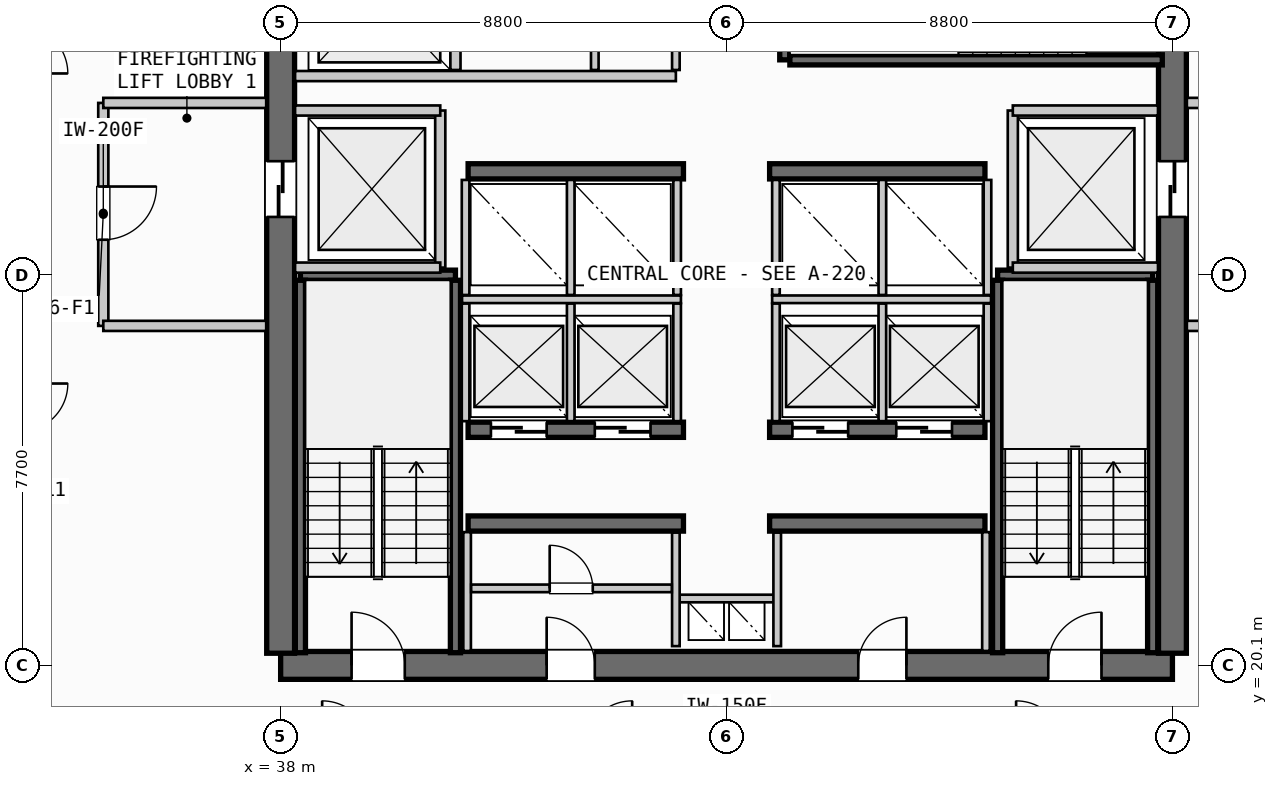
"""IFC4 building model, lengths in metres.
Left out: names, types, materials, properties, quantities, classifications, styles, units other than length and angle.
Written with IfcOpenShell. Run it as: python <this file> out.ifc"""

import sys

from ifc_helpers import new_model, si_unit, direction, frame, frame_2d, origin, place, context, subcontext, project, spatial, rectangle, extrude, source, transform, mapped, element, fill, save


model = new_model("IFC4")
c1 = context("Model", 3, precision=1e-05, world=origin(), true_north=direction((0.0, 1.0)))
c2 = subcontext(c1, "Body", "Model", "MODEL_VIEW")
j1 = project(units=[si_unit("LENGTHUNIT", "METRE"), si_unit("PLANEANGLEUNIT", "RADIAN")], contexts=[c1])
p1 = place(None, origin())
s1 = spatial("IfcSite", under=j1, at=p1, CompositionType="ELEMENT")
p2 = place(p1, origin())
s2 = spatial("IfcBuilding", under=s1, at=p2, CompositionType="ELEMENT")
p3 = place(p2, frame((0.0, 0.0, 143.0)))
s3 = spatial("IfcBuildingStorey", under=s2, at=p3, CompositionType="ELEMENT", Elevation=143.0)
p4 = place(p3, frame((38.0, 20.1, 0.0), z_axis=(0.0, 0.0, 1.0), x_axis=(1.0, 0.0, 0.0)))
e1 = element("IfcWall", 1, at=p4, inside=s3, PredefinedType="SHEAR", context=c2, shape_type="SweptSolid", body=[
    extrude(rectangle(XDim=17.6, YDim=0.55, at=frame_2d((8.8, 0.0))), origin(), (0.0, 0.0, 1.0), 3.3),
])
p5 = place(p4, frame((1.4, 0.0, 0.0)))
e2 = element("IfcOpeningElement", 2, at=p5, cuts=e1, PredefinedType="OPENING", context=c2, shape_type="SweptSolid", body=[
    extrude(rectangle(XDim=1.05, YDim=2.15, at=frame_2d((0.525, 1.075))), frame((0.0, 0.285, 0.0), z_axis=(0.0, -1.0, 0.0), x_axis=(1.0, 0.0, 0.0)), (0.0, 0.0, 1.0), 0.57),
])
p6 = place(p4, frame((15.15, 0.0, 0.0)))
e3 = element("IfcOpeningElement", 3, at=p6, cuts=e1, PredefinedType="OPENING", context=c2, shape_type="SweptSolid", body=[
    extrude(rectangle(XDim=1.05, YDim=2.15, at=frame_2d((0.525, 1.075))), frame((0.0, 0.285, 0.0), z_axis=(0.0, -1.0, 0.0), x_axis=(1.0, 0.0, 0.0)), (0.0, 0.0, 1.0), 0.57),
])
p7 = place(p4, frame((5.25, 0.0, 0.0)))
e4 = element("IfcOpeningElement", 4, at=p7, cuts=e1, PredefinedType="OPENING", context=c2, shape_type="SweptSolid", body=[
    extrude(rectangle(XDim=0.95, YDim=2.15, at=frame_2d((0.475, 1.075))), frame((0.0, 0.285, 0.0), z_axis=(0.0, -1.0, 0.0), x_axis=(1.0, 0.0, 0.0)), (0.0, 0.0, 1.0), 0.57),
])
p8 = place(p4, frame((11.4, 0.0, 0.0)))
e5 = element("IfcOpeningElement", 5, at=p8, cuts=e1, PredefinedType="OPENING", context=c2, shape_type="SweptSolid", body=[
    extrude(rectangle(XDim=0.95, YDim=2.15, at=frame_2d((0.475, 1.075))), frame((0.0, 0.285, 0.0), z_axis=(0.0, -1.0, 0.0), x_axis=(1.0, 0.0, 0.0)), (0.0, 0.0, 1.0), 0.57),
])
p9 = place(p3, frame((38.0, 35.26, 0.0), z_axis=(0.0, 0.0, 1.0), x_axis=(0.0, -1.0, 0.0)))
e6 = element("IfcWall", 6, at=p9, inside=s3, PredefinedType="SHEAR", context=c2, shape_type="SweptSolid", body=[
    extrude(rectangle(XDim=14.92, YDim=0.55, at=frame_2d((7.46, 0.0))), origin(), (0.0, 0.0, 1.0), 3.3),
])
p10 = place(p9, frame((5.21, 0.0, 0.0)))
e7 = element("IfcOpeningElement", 7, at=p10, cuts=e6, PredefinedType="OPENING", context=c2, shape_type="SweptSolid", body=[
    extrude(rectangle(XDim=1.1, YDim=2.2, at=frame_2d((0.55, 1.1))), frame((0.0, 0.285, 0.0), z_axis=(0.0, -1.0, 0.0), x_axis=(1.0, 0.0, 0.0)), (0.0, 0.0, 1.0), 0.57),
])
p11 = place(p3, frame((55.6, 20.34, 0.0), z_axis=(0.0, 0.0, 1.0), x_axis=(0.0, 1.0, 0.0)))
e8 = element("IfcWall", 8, at=p11, inside=s3, PredefinedType="SHEAR", context=c2, shape_type="SweptSolid", body=[
    extrude(rectangle(XDim=14.92, YDim=0.55, at=frame_2d((7.46, 0.0))), origin(), (0.0, 0.0, 1.0), 3.3),
])
p12 = place(p11, frame((12.71, 0.0, 0.0)))
e9 = element("IfcOpeningElement", 9, at=p12, cuts=e8, PredefinedType="OPENING", context=c2, shape_type="SweptSolid", body=[
    extrude(rectangle(XDim=1.05, YDim=2.15, at=frame_2d((0.525, 1.075))), frame((0.0, 0.285, 0.0), z_axis=(0.0, -1.0, 0.0), x_axis=(1.0, 0.0, 0.0)), (0.0, 0.0, 1.0), 0.57),
])
p13 = place(p11, frame((8.61, 0.0, 0.0)))
e10 = element("IfcOpeningElement", 10, at=p13, cuts=e8, PredefinedType="OPENING", context=c2, shape_type="SweptSolid", body=[
    extrude(rectangle(XDim=1.1, YDim=2.2, at=frame_2d((0.55, 1.1))), frame((0.0, 0.285, 0.0), z_axis=(0.0, -1.0, 0.0), x_axis=(1.0, 0.0, 0.0)), (0.0, 0.0, 1.0), 0.57),
])
for number, where, z_axis, x_axis in (
    (11, (41.7, 22.9, 0.0), (0.0, 0.0, 1.0), (1.0, 0.0, 0.0)),
    (12, (47.65, 22.9, 0.0), (0.0, 0.0, 1.0), (1.0, 0.0, 0.0)),
):
    element("IfcWall", number, at=place(p3, frame(where, z_axis=z_axis, x_axis=x_axis)), inside=s3, PredefinedType="SHEAR", context=c2, shape_type="SweptSolid", body=[
        extrude(rectangle(XDim=4.25, YDim=0.3, at=frame_2d((2.125, 0.0))), origin(), (0.0, 0.0, 1.0), 3.3),
    ])
p14 = place(p3, frame((41.7, 24.75, 0.0), z_axis=(0.0, 0.0, 1.0), x_axis=(1.0, 0.0, 0.0)))
e13 = element("IfcWall", 13, at=p14, inside=s3, PredefinedType="SHEAR", context=c2, shape_type="SweptSolid", body=[
    extrude(rectangle(XDim=4.25, YDim=0.3, at=frame_2d((2.125, 0.0))), origin(), (0.0, 0.0, 1.0), 3.3),
])
p15 = place(p14, frame((0.45, 0.0, 0.0)))
e14 = element("IfcOpeningElement", 14, at=p15, cuts=e13, PredefinedType="OPENING", context=c2, shape_type="SweptSolid", body=[
    extrude(rectangle(XDim=1.1, YDim=2.2, at=frame_2d((0.55, 1.1))), frame((0.0, 0.16, 0.0), z_axis=(0.0, -1.0, 0.0), x_axis=(1.0, 0.0, 0.0)), (0.0, 0.0, 1.0), 0.32),
])
p16 = place(p14, frame((2.5, 0.0, 0.0)))
e15 = element("IfcOpeningElement", 15, at=p16, cuts=e13, PredefinedType="OPENING", context=c2, shape_type="SweptSolid", body=[
    extrude(rectangle(XDim=1.1, YDim=2.2, at=frame_2d((0.55, 1.1))), frame((0.0, 0.16, 0.0), z_axis=(0.0, -1.0, 0.0), x_axis=(1.0, 0.0, 0.0)), (0.0, 0.0, 1.0), 0.32),
])
p17 = place(p3, frame((47.65, 24.75, 0.0), z_axis=(0.0, 0.0, 1.0), x_axis=(1.0, 0.0, 0.0)))
e16 = element("IfcWall", 16, at=p17, inside=s3, PredefinedType="SHEAR", context=c2, shape_type="SweptSolid", body=[
    extrude(rectangle(XDim=4.25, YDim=0.3, at=frame_2d((2.125, 0.0))), origin(), (0.0, 0.0, 1.0), 3.3),
])
p18 = place(p17, frame((0.45, 0.0, 0.0)))
e17 = element("IfcOpeningElement", 17, at=p18, cuts=e16, PredefinedType="OPENING", context=c2, shape_type="SweptSolid", body=[
    extrude(rectangle(XDim=1.1, YDim=2.2, at=frame_2d((0.55, 1.1))), frame((0.0, 0.16, 0.0), z_axis=(0.0, -1.0, 0.0), x_axis=(1.0, 0.0, 0.0)), (0.0, 0.0, 1.0), 0.32),
])
p19 = place(p17, frame((2.5, 0.0, 0.0)))
e18 = element("IfcOpeningElement", 18, at=p19, cuts=e16, PredefinedType="OPENING", context=c2, shape_type="SweptSolid", body=[
    extrude(rectangle(XDim=1.1, YDim=2.2, at=frame_2d((0.55, 1.1))), frame((0.0, 0.16, 0.0), z_axis=(0.0, -1.0, 0.0), x_axis=(1.0, 0.0, 0.0)), (0.0, 0.0, 1.0), 0.32),
])
for number, where, z_axis, x_axis in (
    (19, (41.7, 29.85, 0.0), (0.0, 0.0, 1.0), (1.0, 0.0, 0.0)),
    (20, (47.65, 29.85, 0.0), (0.0, 0.0, 1.0), (1.0, 0.0, 0.0)),
):
    element("IfcWall", number, at=place(p3, frame(where, z_axis=z_axis, x_axis=x_axis)), inside=s3, PredefinedType="SHEAR", context=c2, shape_type="SweptSolid", body=[
        extrude(rectangle(XDim=4.25, YDim=0.3, at=frame_2d((2.125, 0.0))), origin(), (0.0, 0.0, 1.0), 3.3),
    ])
p20 = place(p3, frame((38.39, 27.8, 0.0), z_axis=(0.0, 0.0, 1.0), x_axis=(1.0, 0.0, 0.0)))
e21 = element("IfcWall", 21, at=p20, inside=s3, PredefinedType="SHEAR", context=c2, shape_type="SweptSolid", body=[
    extrude(rectangle(XDim=3.06, YDim=0.2, at=frame_2d((1.53, 0.0))), origin(), (0.0, 0.0, 1.0), 3.3),
])
for number, where, z_axis, x_axis in (
    (22, (41.45, 27.7, 0.0), (0.0, 0.0, 1.0), (0.0, -1.0, 0.0)),
    (23, (38.39, 20.35, 0.0), (0.0, 0.0, 1.0), (0.0, 1.0, 0.0)),
):
    element("IfcWall", number, at=place(p3, frame(where, z_axis=z_axis, x_axis=x_axis)), inside=s3, PredefinedType="SHEAR", context=c2, shape_type="SweptSolid", body=[
        extrude(rectangle(XDim=7.35, YDim=0.2, at=frame_2d((3.675, 0.0))), origin(), (0.0, 0.0, 1.0), 3.3),
    ])
p21 = place(p3, frame((52.15, 27.8, 0.0), z_axis=(0.0, 0.0, 1.0), x_axis=(1.0, 0.0, 0.0)))
e24 = element("IfcWall", 24, at=p21, inside=s3, PredefinedType="SHEAR", context=c2, shape_type="SweptSolid", body=[
    extrude(rectangle(XDim=3.06, YDim=0.2, at=frame_2d((1.53, 0.0))), origin(), (0.0, 0.0, 1.0), 3.3),
])
for number, where, z_axis, x_axis in (
    (25, (55.21, 27.7, 0.0), (0.0, 0.0, 1.0), (0.0, -1.0, 0.0)),
    (26, (52.15, 20.35, 0.0), (0.0, 0.0, 1.0), (0.0, 1.0, 0.0)),
):
    element("IfcWall", number, at=place(p3, frame(where, z_axis=z_axis, x_axis=x_axis)), inside=s3, PredefinedType="SHEAR", context=c2, shape_type="SweptSolid", body=[
        extrude(rectangle(XDim=7.35, YDim=0.2, at=frame_2d((3.675, 0.0))), origin(), (0.0, 0.0, 1.0), 3.3),
    ])
p22 = place(p3, frame((47.95, 32.05, 0.0), z_axis=(0.0, 0.0, 1.0), x_axis=(0.0, 1.0, 0.0)))
e27 = element("IfcWall", 27, at=p22, inside=s3, PredefinedType="SHEAR", context=c2, shape_type="SweptSolid", body=[
    extrude(rectangle(XDim=3.06, YDim=0.2, at=frame_2d((1.53, 0.0))), origin(), (0.0, 0.0, 1.0), 3.3),
])
p23 = place(p3, frame((55.4, 32.05, 0.0), z_axis=(0.0, 0.0, 1.0), x_axis=(-1.0, 0.0, 0.0)))
e28 = element("IfcWall", 28, at=p23, inside=s3, PredefinedType="SHEAR", context=c2, shape_type="SweptSolid", body=[
    extrude(rectangle(XDim=7.35, YDim=0.2, at=frame_2d((3.675, 0.0))), origin(), (0.0, 0.0, 1.0), 3.3),
])
p24 = place(p3, frame((45.8, 21.42, 0.0), z_axis=(0.0, 0.0, 1.0), x_axis=(1.0, 0.0, 0.0)))
e29 = element("IfcWall", 29, at=p24, inside=s3, PredefinedType="PARTITIONING", context=c2, shape_type="SweptSolid", body=[
    extrude(rectangle(XDim=2.0, YDim=0.15, at=frame_2d((1.0, 0.0))), origin(), (0.0, 0.0, 1.0), 2.305),
])
for number, where, z_axis, x_axis in (
    (30, (45.8, 20.48, 0.0), (0.0, 0.0, 1.0), (0.0, 1.0, 0.0)),
    (31, (47.8, 20.48, 0.0), (0.0, 0.0, 1.0), (0.0, 1.0, 0.0)),
):
    element("IfcWall", number, at=place(p3, frame(where, z_axis=z_axis, x_axis=x_axis)), inside=s3, PredefinedType="PARTITIONING", context=c2, shape_type="SweptSolid", body=[
        extrude(rectangle(XDim=2.24, YDim=0.15, at=frame_2d((1.12, 0.0))), origin(), (0.0, 0.0, 1.0), 2.305),
    ])
p25 = place(p3, frame((41.15, 27.95, 0.0), z_axis=(0.0, 0.0, 1.0), x_axis=(0.0, 1.0, 0.0)))
e32 = element("IfcWall", 32, at=p25, inside=s3, PredefinedType="PARTITIONING", context=c2, shape_type="SweptSolid", body=[
    extrude(rectangle(XDim=3.1, YDim=0.2, at=frame_2d((1.55, 0.0))), origin(), (0.0, 0.0, 1.0), 2.305),
])
for number, where, z_axis, x_axis in (
    (33, (38.285, 27.95, 0.0), (0.0, 0.0, 1.0), (1.0, 0.0, 0.0)),
    (34, (38.285, 31.05, 0.0), (0.0, 0.0, 1.0), (1.0, 0.0, 0.0)),
):
    element("IfcWall", number, at=place(p3, frame(where, z_axis=z_axis, x_axis=x_axis)), inside=s3, PredefinedType="PARTITIONING", context=c2, shape_type="SweptSolid", body=[
        extrude(rectangle(XDim=2.865, YDim=0.2, at=frame_2d((1.433, 0.0))), origin(), (0.0, 0.0, 1.0), 2.305),
    ])
p26 = place(p3, frame((34.5, 31.2, 0.0), z_axis=(0.0, 0.0, 1.0), x_axis=(0.0, -1.0, 0.0)))
e35 = element("IfcWall", 35, at=p26, inside=s3, PredefinedType="PARTITIONING", context=c2, shape_type="SweptSolid", body=[
    extrude(rectangle(XDim=4.4, YDim=0.2, at=frame_2d((2.2, 0.0))), origin(), (0.0, 0.0, 1.0), 2.305),
])
p27 = place(p26, frame((1.65, 0.0, 0.0)))
e36 = element("IfcOpeningElement", 36, at=p27, cuts=e35, PredefinedType="OPENING", context=c2, shape_type="SweptSolid", body=[
    extrude(rectangle(XDim=1.05, YDim=2.15, at=frame_2d((0.525, 1.075))), frame((0.0, 0.11, 0.0), z_axis=(0.0, -1.0, 0.0), x_axis=(1.0, 0.0, 0.0)), (0.0, 0.0, 1.0), 0.22),
])
for number, where, z_axis, x_axis in (
    (37, (34.5, 26.8, 0.0), (0.0, 0.0, 1.0), (1.0, 0.0, 0.0)),
    (38, (34.5, 31.2, 0.0), (0.0, 0.0, 1.0), (1.0, 0.0, 0.0)),
):
    element("IfcWall", number, at=place(p3, frame(where, z_axis=z_axis, x_axis=x_axis)), inside=s3, PredefinedType="PARTITIONING", context=c2, shape_type="SweptSolid", body=[
        extrude(rectangle(XDim=3.215, YDim=0.2, at=frame_2d((1.607, 0.0))), origin(), (0.0, 0.0, 1.0), 2.305),
    ])
p28 = place(p3, frame((52.45, 27.95, 0.0), z_axis=(0.0, 0.0, 1.0), x_axis=(0.0, 1.0, 0.0)))
e39 = element("IfcWall", 39, at=p28, inside=s3, PredefinedType="PARTITIONING", context=c2, shape_type="SweptSolid", body=[
    extrude(rectangle(XDim=3.1, YDim=0.2, at=frame_2d((1.55, 0.0))), origin(), (0.0, 0.0, 1.0), 2.305),
])
for number, where, z_axis, x_axis in (
    (40, (52.45, 27.95, 0.0), (0.0, 0.0, 1.0), (1.0, 0.0, 0.0)),
    (41, (52.45, 31.05, 0.0), (0.0, 0.0, 1.0), (1.0, 0.0, 0.0)),
):
    element("IfcWall", number, at=place(p3, frame(where, z_axis=z_axis, x_axis=x_axis)), inside=s3, PredefinedType="PARTITIONING", context=c2, shape_type="SweptSolid", body=[
        extrude(rectangle(XDim=2.865, YDim=0.2, at=frame_2d((1.433, 0.0))), origin(), (0.0, 0.0, 1.0), 2.305),
    ])
for number, where, z_axis, x_axis in (
    (42, (55.885, 26.8, 0.0), (0.0, 0.0, 1.0), (1.0, 0.0, 0.0)),
    (43, (55.885, 31.2, 0.0), (0.0, 0.0, 1.0), (1.0, 0.0, 0.0)),
):
    element("IfcWall", number, at=place(p3, frame(where, z_axis=z_axis, x_axis=x_axis)), inside=s3, PredefinedType="PARTITIONING", context=c2, shape_type="SweptSolid", body=[
        extrude(rectangle(XDim=3.215, YDim=0.2, at=frame_2d((1.607, 0.0))), origin(), (0.0, 0.0, 1.0), 2.305),
    ])
for number, where, z_axis, x_axis in (
    (44, (41.68, 20.385, 0.0), (0.0, 0.0, 1.0), (0.0, 1.0, 0.0)),
    (45, (51.92, 20.385, 0.0), (0.0, 0.0, 1.0), (0.0, 1.0, 0.0)),
):
    element("IfcWall", number, at=place(p3, frame(where, z_axis=z_axis, x_axis=x_axis)), inside=s3, PredefinedType="PARTITIONING", context=c2, shape_type="SweptSolid", body=[
        extrude(rectangle(XDim=2.345, YDim=0.15, at=frame_2d((1.172, 0.0))), origin(), (0.0, 0.0, 1.0), 2.305),
    ])
p29 = place(p3, frame((41.76, 21.62, 0.0), z_axis=(0.0, 0.0, 1.0), x_axis=(1.0, 0.0, 0.0)))
e46 = element("IfcWall", 46, at=p29, inside=s3, PredefinedType="PARTITIONING", context=c2, shape_type="SweptSolid", body=[
    extrude(rectangle(XDim=3.96, YDim=0.15, at=frame_2d((1.98, 0.0))), origin(), (0.0, 0.0, 1.0), 2.305),
])
p30 = place(p29, frame((1.55, 0.0, 0.0)))
e47 = element("IfcOpeningElement", 47, at=p30, cuts=e46, PredefinedType="OPENING", context=c2, shape_type="SweptSolid", body=[
    extrude(rectangle(XDim=0.85, YDim=2.15, at=frame_2d((0.425, 1.075))), frame((0.0, 0.085, 0.0), z_axis=(0.0, -1.0, 0.0), x_axis=(1.0, 0.0, 0.0)), (0.0, 0.0, 1.0), 0.17),
])
p31 = place(p3, frame((41.58, 27.325, 0.0), z_axis=(0.0, 0.0, 1.0), x_axis=(1.0, 0.0, 0.0)))
e48 = element("IfcWall", 48, at=p31, inside=s3, PredefinedType="PARTITIONING", context=c2, shape_type="SweptSolid", body=[
    extrude(rectangle(XDim=4.32, YDim=0.15, at=frame_2d((2.16, 0.0))), origin(), (0.0, 0.0, 1.0), 2.305),
])
p32 = place(p3, frame((47.7, 27.325, 0.0), z_axis=(0.0, 0.0, 1.0), x_axis=(1.0, 0.0, 0.0)))
e49 = element("IfcWall", 49, at=p32, inside=s3, PredefinedType="PARTITIONING", context=c2, shape_type="SweptSolid", body=[
    extrude(rectangle(XDim=4.32, YDim=0.15, at=frame_2d((2.16, 0.0))), origin(), (0.0, 0.0, 1.0), 2.305),
])
for number, where, z_axis, x_axis in (
    (50, (41.65, 24.92, 0.0), (0.0, 0.0, 1.0), (0.0, 1.0, 0.0)),
    (51, (43.725, 24.92, 0.0), (0.0, 0.0, 1.0), (0.0, 1.0, 0.0)),
    (52, (45.825, 24.92, 0.0), (0.0, 0.0, 1.0), (0.0, 1.0, 0.0)),
    (53, (47.775, 24.92, 0.0), (0.0, 0.0, 1.0), (0.0, 1.0, 0.0)),
    (54, (49.875, 24.92, 0.0), (0.0, 0.0, 1.0), (0.0, 1.0, 0.0)),
    (55, (51.95, 24.92, 0.0), (0.0, 0.0, 1.0), (0.0, 1.0, 0.0)),
):
    element("IfcWall", number, at=place(p3, frame(where, z_axis=z_axis, x_axis=x_axis)), inside=s3, PredefinedType="PARTITIONING", context=c2, shape_type="SweptSolid", body=[
        extrude(rectangle(XDim=2.32, YDim=0.15, at=frame_2d((1.16, 0.0))), origin(), (0.0, 0.0, 1.0), 2.305),
    ])
for number, where, z_axis, x_axis in (
    (56, (41.65, 27.41, 0.0), (0.0, 0.0, 1.0), (0.0, 1.0, 0.0)),
    (57, (43.725, 27.41, 0.0), (0.0, 0.0, 1.0), (0.0, 1.0, 0.0)),
    (58, (45.825, 27.41, 0.0), (0.0, 0.0, 1.0), (0.0, 1.0, 0.0)),
    (59, (47.775, 27.41, 0.0), (0.0, 0.0, 1.0), (0.0, 1.0, 0.0)),
    (60, (49.875, 27.41, 0.0), (0.0, 0.0, 1.0), (0.0, 1.0, 0.0)),
    (61, (51.95, 27.41, 0.0), (0.0, 0.0, 1.0), (0.0, 1.0, 0.0)),
):
    element("IfcWall", number, at=place(p3, frame(where, z_axis=z_axis, x_axis=x_axis)), inside=s3, PredefinedType="PARTITIONING", context=c2, shape_type="SweptSolid", body=[
        extrude(rectangle(XDim=2.27, YDim=0.15, at=frame_2d((1.135, 0.0))), origin(), (0.0, 0.0, 1.0), 2.305),
    ])
p33 = place(p3, frame((41.45, 31.85, 0.0), z_axis=(0.0, 0.0, 1.0), x_axis=(0.0, 1.0, 0.0)))
e62 = element("IfcWall", 62, at=p33, inside=s3, PredefinedType="PARTITIONING", context=c2, shape_type="SweptSolid", body=[
    extrude(rectangle(XDim=3.365, YDim=0.2, at=frame_2d((1.683, 0.0))), origin(), (0.0, 0.0, 1.0), 2.305),
])
p34 = place(p3, frame((38.285, 31.73, 0.0), z_axis=(0.0, 0.0, 1.0), x_axis=(1.0, 0.0, 0.0)))
e63 = element("IfcWall", 63, at=p34, inside=s3, PredefinedType="PARTITIONING", context=c2, shape_type="SweptSolid", body=[
    extrude(rectangle(XDim=7.515, YDim=0.2, at=frame_2d((3.758, 0.0))), origin(), (0.0, 0.0, 1.0), 2.305),
])
p35 = place(p3, frame((45.8, 31.85, 0.0), z_axis=(0.0, 0.0, 1.0), x_axis=(0.0, 1.0, 0.0)))
e64 = element("IfcWall", 64, at=p35, inside=s3, PredefinedType="PARTITIONING", context=c2, shape_type="SweptSolid", body=[
    extrude(rectangle(XDim=3.365, YDim=0.15, at=frame_2d((1.683, 0.0))), origin(), (0.0, 0.0, 1.0), 2.305),
])
p36 = place(p3, frame((44.2, 31.85, 0.0), z_axis=(0.0, 0.0, 1.0), x_axis=(0.0, 1.0, 0.0)))
e65 = element("IfcWall", 65, at=p36, inside=s3, PredefinedType="PLUMBINGWALL", context=c2, shape_type="SweptSolid", body=[
    extrude(rectangle(XDim=3.365, YDim=0.15, at=frame_2d((1.683, 0.0))), origin(), (0.0, 0.0, 1.0), 2.305),
])
m1 = source(origin(), c2, "Body", "SweptSolid", [
    extrude(rectangle(XDim=1.05, YDim=2.15, at=frame_2d((0.525, 1.075))), frame((0.0, 0.025, 0.0), z_axis=(0.0, -1.0, 0.0), x_axis=(1.0, 0.0, 0.0)), (0.0, 0.0, 1.0), 0.05),
])
p37 = place(p5, origin())
e66 = element("IfcDoor", 66, at=p37, inside=s3, OperationType="SINGLE_SWING_LEFT", PredefinedType="DOOR", context=c2, shape_type="MappedRepresentation", body=[
    mapped(m1, transform((0.0, 0.0, 0.0), scale=1.0)),
])
fill(e2, e66)
p38 = place(p6, origin())
e67 = element("IfcDoor", 67, at=p38, inside=s3, OperationType="SINGLE_SWING_RIGHT", PredefinedType="DOOR", context=c2, shape_type="MappedRepresentation", body=[
    mapped(m1, transform((0.0, 0.0, 0.0), scale=1.0)),
])
fill(e3, e67)
m2 = source(origin(), c2, "Body", "SweptSolid", [
    extrude(rectangle(XDim=1.1, YDim=2.2, at=frame_2d((0.55, 1.1))), frame((0.0, 0.025, 0.0), z_axis=(0.0, -1.0, 0.0), x_axis=(1.0, 0.0, 0.0)), (0.0, 0.0, 1.0), 0.05),
])
p39 = place(p10, origin())
e68 = element("IfcDoor", 68, at=p39, inside=s3, OperationType="SLIDING_TO_LEFT", PredefinedType="DOOR", context=c2, shape_type="MappedRepresentation", body=[
    mapped(m2, transform((0.0, 0.0, 0.0), scale=1.0)),
])
fill(e7, e68)
p40 = place(p13, origin())
e69 = element("IfcDoor", 69, at=p40, inside=s3, OperationType="SLIDING_TO_RIGHT", PredefinedType="DOOR", context=c2, shape_type="MappedRepresentation", body=[
    mapped(m2, transform((0.0, 0.0, 0.0), scale=1.0)),
])
fill(e10, e69)
m3 = source(origin(), c2, "Body", "SweptSolid", [
    extrude(rectangle(XDim=0.95, YDim=2.15, at=frame_2d((0.475, 1.075))), frame((0.0, 0.025, 0.0), z_axis=(0.0, -1.0, 0.0), x_axis=(1.0, 0.0, 0.0)), (0.0, 0.0, 1.0), 0.05),
])
p41 = place(p7, origin())
e70 = element("IfcDoor", 70, at=p41, inside=s3, OperationType="SINGLE_SWING_LEFT", PredefinedType="DOOR", context=c2, shape_type="MappedRepresentation", body=[
    mapped(m3, transform((0.0, 0.0, 0.0), scale=1.0)),
])
fill(e4, e70)
p42 = place(p8, origin())
e71 = element("IfcDoor", 71, at=p42, inside=s3, OperationType="SINGLE_SWING_RIGHT", PredefinedType="DOOR", context=c2, shape_type="MappedRepresentation", body=[
    mapped(m3, transform((0.0, 0.0, 0.0), scale=1.0)),
])
fill(e5, e71)
p43 = place(p15, origin())
e72 = element("IfcDoor", 72, at=p43, inside=s3, OperationType="SLIDING_TO_RIGHT", PredefinedType="DOOR", context=c2, shape_type="MappedRepresentation", body=[
    mapped(m2, transform((0.0, 0.0, 0.0), scale=1.0)),
])
fill(e14, e72)
p44 = place(p16, origin())
e73 = element("IfcDoor", 73, at=p44, inside=s3, OperationType="SLIDING_TO_RIGHT", PredefinedType="DOOR", context=c2, shape_type="MappedRepresentation", body=[
    mapped(m2, transform((0.0, 0.0, 0.0), scale=1.0)),
])
fill(e15, e73)
p45 = place(p18, origin())
e74 = element("IfcDoor", 74, at=p45, inside=s3, OperationType="SLIDING_TO_RIGHT", PredefinedType="DOOR", context=c2, shape_type="MappedRepresentation", body=[
    mapped(m2, transform((0.0, 0.0, 0.0), scale=1.0)),
])
fill(e17, e74)
p46 = place(p19, origin())
e75 = element("IfcDoor", 75, at=p46, inside=s3, OperationType="SLIDING_TO_RIGHT", PredefinedType="DOOR", context=c2, shape_type="MappedRepresentation", body=[
    mapped(m2, transform((0.0, 0.0, 0.0), scale=1.0)),
])
fill(e18, e75)
p47 = place(p27, origin())
e76 = element("IfcDoor", 76, at=p47, inside=s3, OperationType="SINGLE_SWING_LEFT", PredefinedType="DOOR", context=c2, shape_type="MappedRepresentation", body=[
    mapped(m1, transform((0.0, 0.0, 0.0), scale=1.0)),
])
fill(e36, e76)
m4 = source(origin(), c2, "Body", "SweptSolid", [
    extrude(rectangle(XDim=0.85, YDim=2.15, at=frame_2d((0.425, 1.075))), frame((0.0, 0.025, 0.0), z_axis=(0.0, -1.0, 0.0), x_axis=(1.0, 0.0, 0.0)), (0.0, 0.0, 1.0), 0.05),
])
p48 = place(p30, origin())
e77 = element("IfcDoor", 77, at=p48, inside=s3, OperationType="SINGLE_SWING_LEFT", PredefinedType="DOOR", context=c2, shape_type="MappedRepresentation", body=[
    mapped(m4, transform((0.0, 0.0, 0.0), scale=1.0)),
])
fill(e47, e77)
save(model, sys.argv[1])
